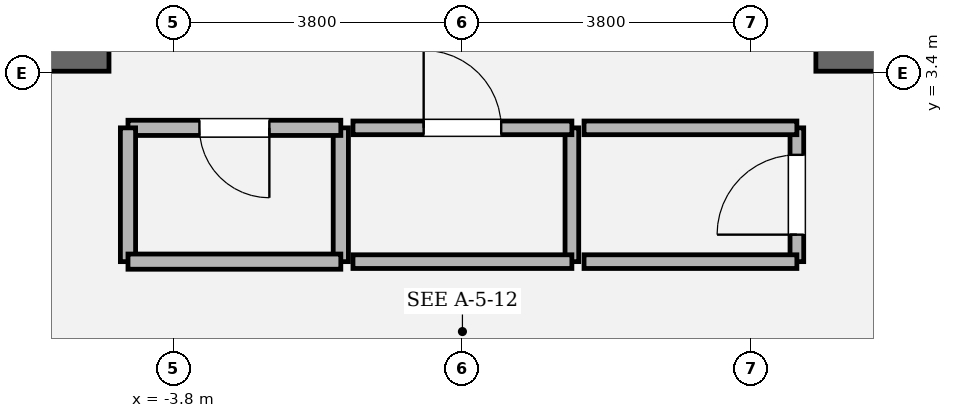
"""IFC4 building model, lengths in metres.
Left out: names, types, materials, properties, quantities, classifications, styles, units other than length and angle.
Written with IfcOpenShell. Run it as: python <this file> out.ifc"""

import sys

from ifc_helpers import new_model, si_unit, direction, frame, frame_2d, origin, place, context, subcontext, project, spatial, rectangle, extrude, element, fill, save


model = new_model("IFC4")
c1 = context("Model", 3, precision=1e-05, world=origin(), true_north=direction((0.0, 1.0)))
c2 = subcontext(c1, "Body", "Model", "MODEL_VIEW")
j1 = project(units=[si_unit("LENGTHUNIT", "METRE"), si_unit("PLANEANGLEUNIT", "RADIAN")], contexts=[c1])
p1 = place(None, origin())
s1 = spatial("IfcSite", under=j1, at=p1, CompositionType="ELEMENT")
p2 = place(p1, origin())
s2 = spatial("IfcBuilding", under=s1, at=p2, CompositionType="ELEMENT")
p3 = place(p2, frame((0.0, 0.0, 52.5)))
s3 = spatial("IfcBuildingStorey", under=s2, at=p3, CompositionType="ELEMENT", Elevation=52.5)
for number, where, z_axis, x_axis in (
    (1, (-9.825, 3.6, 0.0), (0.0, 0.0, 1.0), (1.0, 0.0, 0.0)),
    (2, (4.65, 3.6, 0.0), (0.0, 0.0, 1.0), (1.0, 0.0, 0.0)),
):
    element("IfcWall", number, at=place(p3, frame(where, z_axis=z_axis, x_axis=x_axis)), inside=s3, PredefinedType="SOLIDWALL", context=c2, shape_type="SweptSolid", body=[
        extrude(rectangle(XDim=5.175, YDim=0.35, at=frame_2d((2.587, 0.0))), origin(), (0.0, 0.0, 1.0), 4.05),
    ])
p4 = place(p3, frame((-1.6, 0.92, 0.0), z_axis=(0.0, 0.0, 1.0), x_axis=(0.0, 1.0, 0.0)))
e3 = element("IfcWall", 3, at=p4, inside=s3, PredefinedType="SOLIDWALL", context=c2, shape_type="SweptSolid", body=[
    extrude(rectangle(XDim=1.76, YDim=0.2, at=frame_2d((0.88, 0.0))), origin(), (0.0, 0.0, 1.0), 3.81),
])
p5 = place(p3, frame((-1.6, 2.68, 0.0), z_axis=(0.0, 0.0, 1.0), x_axis=(-1.0, 0.0, 0.0)))
e4 = element("IfcWall", 4, at=p5, inside=s3, PredefinedType="SOLIDWALL", context=c2, shape_type="SweptSolid", body=[
    extrude(rectangle(XDim=2.8, YDim=0.2, at=frame_2d((1.4, 0.0))), origin(), (0.0, 0.0, 1.0), 3.81),
])
p6 = place(p5, frame((0.94, 0.0, 0.0)))
e5 = element("IfcOpeningElement", 5, at=p6, cuts=e4, PredefinedType="OPENING", context=c2, shape_type="SweptSolid", body=[
    extrude(rectangle(XDim=0.92, YDim=2.1, at=frame_2d((0.46, 1.05))), frame((0.0, 0.11, 0.0), z_axis=(0.0, -1.0, 0.0), x_axis=(1.0, 0.0, 0.0)), (0.0, 0.0, 1.0), 0.22),
])
p7 = place(p3, frame((-4.4, 2.68, 0.0), z_axis=(0.0, 0.0, 1.0), x_axis=(0.0, -1.0, 0.0)))
e6 = element("IfcWall", 6, at=p7, inside=s3, PredefinedType="SOLIDWALL", context=c2, shape_type="SweptSolid", body=[
    extrude(rectangle(XDim=1.76, YDim=0.2, at=frame_2d((0.88, 0.0))), origin(), (0.0, 0.0, 1.0), 3.81),
])
p8 = place(p3, frame((-4.4, 0.92, 0.0), z_axis=(0.0, 0.0, 1.0), x_axis=(1.0, 0.0, 0.0)))
e7 = element("IfcWall", 7, at=p8, inside=s3, PredefinedType="SOLIDWALL", context=c2, shape_type="SweptSolid", body=[
    extrude(rectangle(XDim=2.8, YDim=0.2, at=frame_2d((1.4, 0.0))), origin(), (0.0, 0.0, 1.0), 3.81),
])
p9 = place(p3, frame((1.44, 0.92, 0.0), z_axis=(0.0, 0.0, 1.0), x_axis=(0.0, 1.0, 0.0)))
e8 = element("IfcWall", 8, at=p9, inside=s3, PredefinedType="PARTITIONING", context=c2, shape_type="SweptSolid", body=[
    extrude(rectangle(XDim=1.76, YDim=0.18, at=frame_2d((0.88, 0.0))), origin(), (0.0, 0.0, 1.0), 3.81),
])
p10 = place(p3, frame((1.44, 2.68, 0.0), z_axis=(0.0, 0.0, 1.0), x_axis=(-1.0, 0.0, 0.0)))
e9 = element("IfcWall", 9, at=p10, inside=s3, PredefinedType="PARTITIONING", context=c2, shape_type="SweptSolid", body=[
    extrude(rectangle(XDim=2.88, YDim=0.18, at=frame_2d((1.44, 0.0))), origin(), (0.0, 0.0, 1.0), 3.81),
])
p11 = place(p10, frame((0.93, 0.0, 0.0)))
e10 = element("IfcOpeningElement", 10, at=p11, cuts=e9, PredefinedType="OPENING", context=c2, shape_type="SweptSolid", body=[
    extrude(rectangle(XDim=1.02, YDim=2.2, at=frame_2d((0.51, 1.1))), frame((0.0, 0.1, 0.0), z_axis=(0.0, -1.0, 0.0), x_axis=(1.0, 0.0, 0.0)), (0.0, 0.0, 1.0), 0.2),
])
p12 = place(p3, frame((-1.44, 0.92, 0.0), z_axis=(0.0, 0.0, 1.0), x_axis=(1.0, 0.0, 0.0)))
e11 = element("IfcWall", 11, at=p12, inside=s3, PredefinedType="PARTITIONING", context=c2, shape_type="SweptSolid", body=[
    extrude(rectangle(XDim=2.88, YDim=0.18, at=frame_2d((1.44, 0.0))), origin(), (0.0, 0.0, 1.0), 3.81),
])
p13 = place(p3, frame((4.4, 0.92, 0.0), z_axis=(0.0, 0.0, 1.0), x_axis=(0.0, 1.0, 0.0)))
e12 = element("IfcWall", 12, at=p13, inside=s3, PredefinedType="PARTITIONING", context=c2, shape_type="SweptSolid", body=[
    extrude(rectangle(XDim=1.76, YDim=0.18, at=frame_2d((0.88, 0.0))), origin(), (0.0, 0.0, 1.0), 3.81),
])
p14 = place(p13, frame((0.355, 0.0, 0.0)))
e13 = element("IfcOpeningElement", 13, at=p14, cuts=e12, PredefinedType="OPENING", context=c2, shape_type="SweptSolid", body=[
    extrude(rectangle(XDim=1.05, YDim=2.2, at=frame_2d((0.525, 1.1))), frame((0.0, 0.1, 0.0), z_axis=(0.0, -1.0, 0.0), x_axis=(1.0, 0.0, 0.0)), (0.0, 0.0, 1.0), 0.2),
])
for number, where, z_axis, x_axis in (
    (14, (4.4, 2.68, 0.0), (0.0, 0.0, 1.0), (-1.0, 0.0, 0.0)),
    (15, (1.6, 0.92, 0.0), (0.0, 0.0, 1.0), (1.0, 0.0, 0.0)),
):
    element("IfcWall", number, at=place(p3, frame(where, z_axis=z_axis, x_axis=x_axis)), inside=s3, PredefinedType="PARTITIONING", context=c2, shape_type="SweptSolid", body=[
        extrude(rectangle(XDim=2.8, YDim=0.18, at=frame_2d((1.4, 0.0))), origin(), (0.0, 0.0, 1.0), 3.81),
    ])
p15 = place(p6, origin())
e16 = element("IfcDoor", 16, at=p15, inside=s3, OperationType="SINGLE_SWING_LEFT", PredefinedType="DOOR", context=c2, shape_type="SweptSolid", body=[
    extrude(rectangle(XDim=0.92, YDim=2.1, at=frame_2d((0.46, 1.05))), frame((0.0, 0.025, 0.0), z_axis=(0.0, -1.0, 0.0), x_axis=(1.0, 0.0, 0.0)), (0.0, 0.0, 1.0), 0.05),
])
fill(e5, e16)
p16 = place(p11, origin())
e17 = element("IfcDoor", 17, at=p16, inside=s3, OperationType="SINGLE_SWING_RIGHT", PredefinedType="DOOR", context=c2, shape_type="SweptSolid", body=[
    extrude(rectangle(XDim=1.02, YDim=2.2, at=frame_2d((0.51, 1.1))), frame((0.0, 0.025, 0.0), z_axis=(0.0, -1.0, 0.0), x_axis=(1.0, 0.0, 0.0)), (0.0, 0.0, 1.0), 0.05),
])
fill(e10, e17)
p17 = place(p14, origin())
e18 = element("IfcDoor", 18, at=p17, inside=s3, OperationType="SINGLE_SWING_LEFT", PredefinedType="DOOR", context=c2, shape_type="SweptSolid", body=[
    extrude(rectangle(XDim=1.05, YDim=2.2, at=frame_2d((0.525, 1.1))), frame((0.0, 0.025, 0.0), z_axis=(0.0, -1.0, 0.0), x_axis=(1.0, 0.0, 0.0)), (0.0, 0.0, 1.0), 0.05),
])
fill(e13, e18)
save(model, sys.argv[1])
